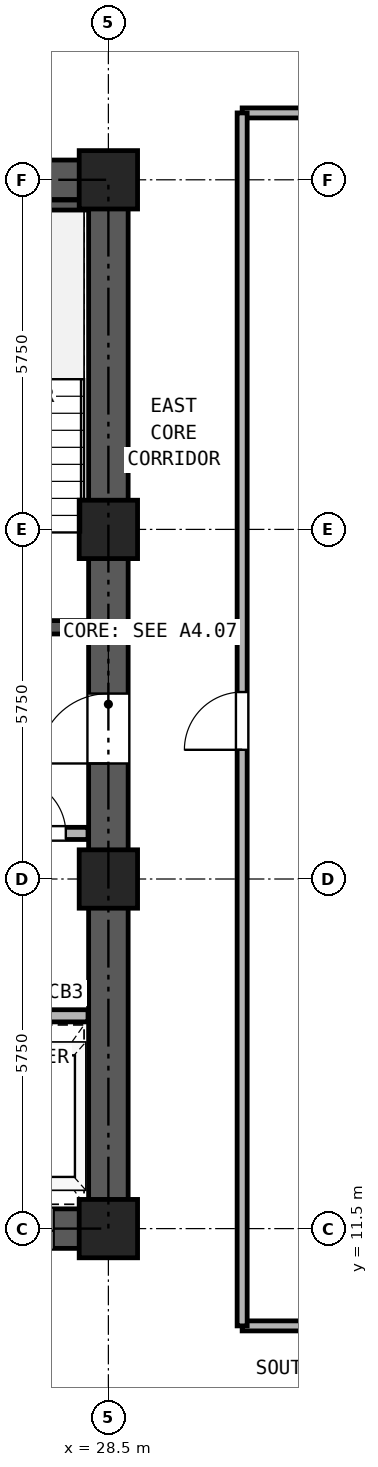
"""IFC4 building model, lengths in metres.
Left out: names, types, materials, properties, quantities, classifications, styles, units other than length and angle.
Written with IfcOpenShell. Run it as: python <this file> out.ifc"""

import sys

from ifc_helpers import new_model, si_unit, direction, frame, frame_2d, origin, origin_2d, place, context, subcontext, project, spatial, rectangle, hollow_rectangle, extrude, source, transform, mapped, element, fill, save


model = new_model("IFC4")
c1 = context("Model", 3, precision=1e-05, world=origin(), true_north=direction((0.0, 1.0)))
c2 = subcontext(c1, "Body", "Model", "MODEL_VIEW")
j1 = project(units=[si_unit("LENGTHUNIT", "METRE"), si_unit("PLANEANGLEUNIT", "RADIAN")], contexts=[c1])
p1 = place(None, origin())
s1 = spatial("IfcSite", under=j1, at=p1, CompositionType="ELEMENT")
p2 = place(p1, origin())
s2 = spatial("IfcBuilding", under=s1, at=p2, CompositionType="ELEMENT")
p3 = place(p2, frame((0.0, 0.0, 81.0)))
s3 = spatial("IfcBuildingStorey", under=s2, at=p3, CompositionType="ELEMENT", Elevation=81.0)
m1 = source(origin(), c2, "Body", "SweptSolid", [
    extrude(hollow_rectangle(XDim=0.96, YDim=0.96, WallThickness=0.06, at=origin_2d()), origin(), (0.0, 0.0, 1.0), 3.32),
])
for number, where, z_axis, x_axis in (
    (1, (28.5, 11.5, 0.0), (0.0, 0.0, 1.0), (1.0, 0.0, 0.0)),
    (2, (28.5, 17.25, 0.0), (0.0, 0.0, 1.0), (1.0, 0.0, 0.0)),
    (3, (28.5, 23.0, 0.0), (0.0, 0.0, 1.0), (1.0, 0.0, 0.0)),
    (4, (28.5, 28.75, 0.0), (0.0, 0.0, 1.0), (1.0, 0.0, 0.0)),
):
    element("IfcColumn", number, at=place(p3, frame(where, z_axis=z_axis, x_axis=x_axis)), inside=s3, PredefinedType="COLUMN", context=c2, shape_type="MappedRepresentation", body=[
        mapped(m1, transform((0.0, 0.0, 0.0), x_axis=(1.0, 0.0, 0.0), y_axis=(0.0, 1.0, 0.0), z_axis=(0.0, 0.0, 1.0), scale=1.0)),
    ])
p4 = place(p3, frame((18.175, 11.5, 0.0), z_axis=(0.0, 0.0, 1.0), x_axis=(1.0, 0.0, 0.0)))
e5 = element("IfcWall", 5, at=p4, inside=s3, PredefinedType="SHEAR", context=c2, shape_type="SweptSolid", body=[
    extrude(rectangle(XDim=10.65, YDim=0.65, at=frame_2d((5.325, 0.0))), origin(), (0.0, 0.0, 1.0), 3.32),
])
p5 = place(p4, frame((1.195, 0.0, 0.0)))
e6 = element("IfcOpeningElement", 6, at=p5, cuts=e5, PredefinedType="OPENING", context=c2, shape_type="SweptSolid", body=[
    extrude(rectangle(XDim=1.1, YDim=2.25, at=frame_2d((0.55, 1.125))), frame((0.0, 0.335, 0.0), z_axis=(0.0, -1.0, 0.0), x_axis=(1.0, 0.0, 0.0)), (0.0, 0.0, 1.0), 0.67),
])
p6 = place(p4, frame((3.495, 0.0, 0.0)))
e7 = element("IfcOpeningElement", 7, at=p6, cuts=e5, PredefinedType="OPENING", context=c2, shape_type="SweptSolid", body=[
    extrude(rectangle(XDim=1.1, YDim=2.25, at=frame_2d((0.55, 1.125))), frame((0.0, 0.335, 0.0), z_axis=(0.0, -1.0, 0.0), x_axis=(1.0, 0.0, 0.0)), (0.0, 0.0, 1.0), 0.67),
])
p7 = place(p4, frame((5.925, 0.0, 0.0)))
e8 = element("IfcOpeningElement", 8, at=p7, cuts=e5, PredefinedType="OPENING", context=c2, shape_type="SweptSolid", body=[
    extrude(rectangle(XDim=1.1, YDim=2.25, at=frame_2d((0.55, 1.125))), frame((0.0, 0.335, 0.0), z_axis=(0.0, -1.0, 0.0), x_axis=(1.0, 0.0, 0.0)), (0.0, 0.0, 1.0), 0.67),
])
p8 = place(p4, frame((8.325, 0.0, 0.0)))
e9 = element("IfcOpeningElement", 9, at=p8, cuts=e5, PredefinedType="OPENING", context=c2, shape_type="SweptSolid", body=[
    extrude(rectangle(XDim=1.1, YDim=2.25, at=frame_2d((0.55, 1.125))), frame((0.0, 0.335, 0.0), z_axis=(0.0, -1.0, 0.0), x_axis=(1.0, 0.0, 0.0)), (0.0, 0.0, 1.0), 0.67),
])
p9 = place(p3, frame((18.175, 28.75, 0.0), z_axis=(0.0, 0.0, 1.0), x_axis=(1.0, 0.0, 0.0)))
e10 = element("IfcWall", 10, at=p9, inside=s3, PredefinedType="SHEAR", context=c2, shape_type="SweptSolid", body=[
    extrude(rectangle(XDim=10.65, YDim=0.65, at=frame_2d((5.325, 0.0))), origin(), (0.0, 0.0, 1.0), 3.32),
])
p10 = place(p9, frame((4.205, 0.0, 0.0)))
e11 = element("IfcOpeningElement", 11, at=p10, cuts=e10, PredefinedType="OPENING", context=c2, shape_type="SweptSolid", body=[
    extrude(rectangle(XDim=0.9, YDim=2.05, at=frame_2d((0.45, 1.025))), frame((0.0, 0.335, 0.0), z_axis=(0.0, -1.0, 0.0), x_axis=(1.0, 0.0, 0.0)), (0.0, 0.0, 1.0), 0.67),
])
p11 = place(p9, frame((5.745, 0.0, 0.0)))
e12 = element("IfcOpeningElement", 12, at=p11, cuts=e10, PredefinedType="OPENING", context=c2, shape_type="SweptSolid", body=[
    extrude(rectangle(XDim=0.9, YDim=2.05, at=frame_2d((0.45, 1.025))), frame((0.0, 0.335, 0.0), z_axis=(0.0, -1.0, 0.0), x_axis=(1.0, 0.0, 0.0)), (0.0, 0.0, 1.0), 0.67),
])
p12 = place(p3, frame((28.5, 11.825, 0.0), z_axis=(0.0, 0.0, 1.0), x_axis=(0.0, 1.0, 0.0)))
e13 = element("IfcWall", 13, at=p12, inside=s3, PredefinedType="SHEAR", context=c2, shape_type="SweptSolid", body=[
    extrude(rectangle(XDim=16.6, YDim=0.65, at=frame_2d((8.3, 0.0))), origin(), (0.0, 0.0, 1.0), 3.32),
])
p13 = place(p12, frame((7.325, 0.0, 0.0)))
e14 = element("IfcOpeningElement", 14, at=p13, cuts=e13, PredefinedType="OPENING", context=c2, shape_type="SweptSolid", body=[
    extrude(rectangle(XDim=1.15, YDim=2.2, at=frame_2d((0.575, 1.1))), frame((0.0, 0.335, 0.0), z_axis=(0.0, -1.0, 0.0), x_axis=(1.0, 0.0, 0.0)), (0.0, 0.0, 1.0), 0.67),
])
p14 = place(p3, frame((25.13, 28.335, 0.0), z_axis=(0.0, 0.0, 1.0), x_axis=(1.0, 0.0, 0.0)))
e15 = element("IfcWall", 15, at=p14, inside=s3, PredefinedType="PARTITIONING", context=c2, shape_type="SweptSolid", body=[
    extrude(rectangle(XDim=3.035, YDim=0.165, at=frame_2d((1.518, 0.0))), origin(), (0.0, 0.0, 1.0), 3.32),
])
p15 = place(p3, frame((25.13, 21.39, 0.0), z_axis=(0.0, 0.0, 1.0), x_axis=(1.0, 0.0, 0.0)))
e16 = element("IfcWall", 16, at=p15, inside=s3, PredefinedType="SOLIDWALL", context=c2, shape_type="SweptSolid", body=[
    extrude(rectangle(XDim=3.035, YDim=0.22, at=frame_2d((1.518, 0.0))), origin(), (0.0, 0.0, 1.0), 3.32),
])
p16 = place(p15, frame((0.92, 0.0, 0.0)))
e17 = element("IfcOpeningElement", 17, at=p16, cuts=e16, PredefinedType="OPENING", context=c2, shape_type="SweptSolid", body=[
    extrude(rectangle(XDim=1.15, YDim=2.2, at=frame_2d((0.575, 1.1))), frame((0.0, 0.12, 0.0), z_axis=(0.0, -1.0, 0.0), x_axis=(1.0, 0.0, 0.0)), (0.0, 0.0, 1.0), 0.24),
])
p17 = place(p3, frame((18.835, 18.0, 0.0), z_axis=(0.0, 0.0, 1.0), x_axis=(1.0, 0.0, 0.0)))
e18 = element("IfcWall", 18, at=p17, inside=s3, PredefinedType="PARTITIONING", context=c2, shape_type="SweptSolid", body=[
    extrude(rectangle(XDim=9.33, YDim=0.2, at=frame_2d((4.665, 0.0))), origin(), (0.0, 0.0, 1.0), 3.32),
])
p18 = place(p17, frame((0.415, 0.0, 0.0)))
e19 = element("IfcOpeningElement", 19, at=p18, cuts=e18, PredefinedType="OPENING", context=c2, shape_type="SweptSolid", body=[
    extrude(rectangle(XDim=1.3, YDim=2.3, at=frame_2d((0.65, 1.15))), frame((0.0, 0.11, 0.0), z_axis=(0.0, -1.0, 0.0), x_axis=(1.0, 0.0, 0.0)), (0.0, 0.0, 1.0), 0.22),
])
p19 = place(p17, frame((2.515, 0.0, 0.0)))
e20 = element("IfcOpeningElement", 20, at=p19, cuts=e18, PredefinedType="OPENING", context=c2, shape_type="SweptSolid", body=[
    extrude(rectangle(XDim=1.3, YDim=2.3, at=frame_2d((0.65, 1.15))), frame((0.0, 0.11, 0.0), z_axis=(0.0, -1.0, 0.0), x_axis=(1.0, 0.0, 0.0)), (0.0, 0.0, 1.0), 0.22),
])
p20 = place(p17, frame((4.935, 0.0, 0.0)))
e21 = element("IfcOpeningElement", 21, at=p20, cuts=e18, PredefinedType="OPENING", context=c2, shape_type="SweptSolid", body=[
    extrude(rectangle(XDim=0.9, YDim=2.05, at=frame_2d((0.45, 1.025))), frame((0.0, 0.11, 0.0), z_axis=(0.0, -1.0, 0.0), x_axis=(1.0, 0.0, 0.0)), (0.0, 0.0, 1.0), 0.22),
])
p21 = place(p17, frame((8.065, 0.0, 0.0)))
e22 = element("IfcOpeningElement", 22, at=p21, cuts=e18, PredefinedType="OPENING", context=c2, shape_type="SweptSolid", body=[
    extrude(rectangle(XDim=0.9, YDim=2.05, at=frame_2d((0.45, 1.025))), frame((0.0, 0.11, 0.0), z_axis=(0.0, -1.0, 0.0), x_axis=(1.0, 0.0, 0.0)), (0.0, 0.0, 1.0), 0.22),
])
p22 = place(p3, frame((18.835, 15.0, 0.0), z_axis=(0.0, 0.0, 1.0), x_axis=(1.0, 0.0, 0.0)))
e23 = element("IfcWall", 23, at=p22, inside=s3, PredefinedType="PARTITIONING", context=c2, shape_type="SweptSolid", body=[
    extrude(rectangle(XDim=9.33, YDim=0.2, at=frame_2d((4.665, 0.0))), origin(), (0.0, 0.0, 1.0), 3.32),
])
for number, where, z_axis, x_axis in (
    (24, (30.7, 9.9, 0.0), (0.0, 0.0, 1.0), (1.0, 0.0, 0.0)),
    (25, (30.7, 29.85, 0.0), (0.0, 0.0, 1.0), (1.0, 0.0, 0.0)),
):
    element("IfcWall", number, at=place(p3, frame(where, z_axis=z_axis, x_axis=x_axis)), inside=s3, PredefinedType="PARTITIONING", context=c2, shape_type="SweptSolid", body=[
        extrude(rectangle(XDim=9.7, YDim=0.165, at=frame_2d((4.85, 0.0))), origin(), (0.0, 0.0, 1.0), 3.32),
    ])
p23 = place(p3, frame((30.7, 9.9, 0.0), z_axis=(0.0, 0.0, 1.0), x_axis=(0.0, 1.0, 0.0)))
e26 = element("IfcWall", 26, at=p23, inside=s3, PredefinedType="PARTITIONING", context=c2, shape_type="SweptSolid", body=[
    extrude(rectangle(XDim=19.95, YDim=0.165, at=frame_2d((9.975, 0.0))), origin(), (0.0, 0.0, 1.0), 3.32),
])
p24 = place(p23, frame((9.475, 0.0, 0.0)))
e27 = element("IfcOpeningElement", 27, at=p24, cuts=e26, PredefinedType="OPENING", context=c2, shape_type="SweptSolid", body=[
    extrude(rectangle(XDim=0.95, YDim=2.15, at=frame_2d((0.475, 1.075))), frame((0.0, 0.093, 0.0), z_axis=(0.0, -1.0, 0.0), x_axis=(1.0, 0.0, 0.0)), (0.0, 0.0, 1.0), 0.185),
])
p25 = place(p21, frame((0.9, 0.0, 0.0), z_axis=(0.0, 0.0, 1.0), x_axis=(-1.0, 0.0, 0.0)))
e28 = element("IfcDoor", 28, at=p25, inside=s3, OperationType="SINGLE_SWING_LEFT", PredefinedType="DOOR", context=c2, shape_type="SweptSolid", body=[
    extrude(rectangle(XDim=0.9, YDim=2.05, at=frame_2d((0.45, 1.025))), frame((0.0, 0.025, 0.0), z_axis=(0.0, -1.0, 0.0), x_axis=(1.0, 0.0, 0.0)), (0.0, 0.0, 1.0), 0.05),
])
fill(e22, e28)
p26 = place(p13, origin())
e29 = element("IfcDoor", 29, at=p26, inside=s3, OperationType="SINGLE_SWING_LEFT", PredefinedType="DOOR", context=c2, shape_type="SweptSolid", body=[
    extrude(rectangle(XDim=1.15, YDim=2.2, at=frame_2d((0.575, 1.1))), frame((0.0, 0.025, 0.0), z_axis=(0.0, -1.0, 0.0), x_axis=(1.0, 0.0, 0.0)), (0.0, 0.0, 1.0), 0.05),
])
fill(e14, e29)
p27 = place(p8, frame((1.1, 0.0, 0.0), z_axis=(0.0, 0.0, 1.0), x_axis=(-1.0, 0.0, 0.0)))
e30 = element("IfcDoor", 30, at=p27, inside=s3, OperationType="DOUBLE_DOOR_SLIDING", PredefinedType="DOOR", context=c2, shape_type="SweptSolid", body=[
    extrude(rectangle(XDim=1.1, YDim=2.25, at=frame_2d((0.55, 1.125))), frame((0.0, 0.025, 0.0), z_axis=(0.0, -1.0, 0.0), x_axis=(1.0, 0.0, 0.0)), (0.0, 0.0, 1.0), 0.05),
])
fill(e9, e30)
p28 = place(p24, origin())
e31 = element("IfcDoor", 31, at=p28, inside=s3, OperationType="SINGLE_SWING_LEFT", PredefinedType="DOOR", context=c2, shape_type="SweptSolid", body=[
    extrude(rectangle(XDim=0.95, YDim=2.15, at=frame_2d((0.475, 1.075))), frame((0.0, 0.025, 0.0), z_axis=(0.0, -1.0, 0.0), x_axis=(1.0, 0.0, 0.0)), (0.0, 0.0, 1.0), 0.05),
])
fill(e27, e31)
save(model, sys.argv[1])
